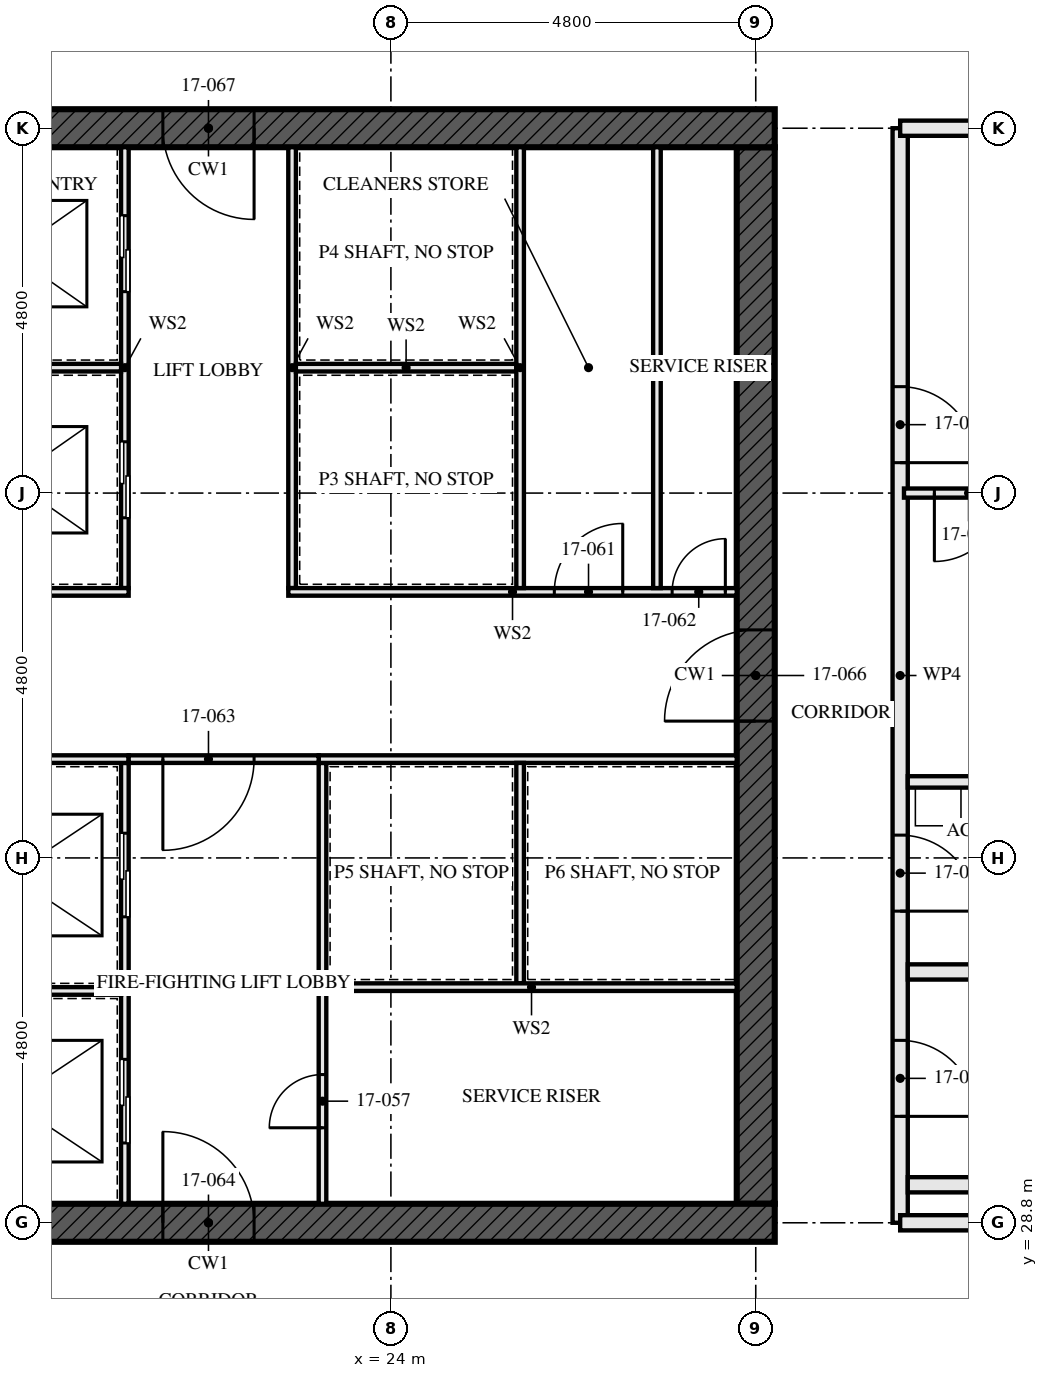
"""IFC4 building model, lengths in metres.
Left out: names, types, materials, properties, quantities, classifications, styles, units other than length and angle.
Written with IfcOpenShell. Run it as: python <this file> out.ifc"""

import sys

from ifc_helpers import new_model, si_unit, direction, frame, frame_2d, origin, place, context, subcontext, project, spatial, rectangle, extrude, element, fill, save


model = new_model("IFC4")
c1 = context("Model", 3, precision=1e-05, world=origin(), true_north=direction((0.0, 1.0)))
c2 = subcontext(c1, "Body", "Model", "MODEL_VIEW")
j1 = project(units=[si_unit("LENGTHUNIT", "METRE"), si_unit("PLANEANGLEUNIT", "RADIAN")], contexts=[c1])
p1 = place(None, origin())
s1 = spatial("IfcSite", under=j1, at=p1, CompositionType="ELEMENT")
p2 = place(p1, origin())
s2 = spatial("IfcBuilding", under=s1, at=p2, CompositionType="ELEMENT")
p3 = place(p2, frame((0.0, 0.0, 65.5)))
s3 = spatial("IfcBuildingStorey", under=s2, at=p3, CompositionType="ELEMENT", Elevation=65.5)
p4 = place(p3, frame((14.15, 28.8, -0.17), z_axis=(0.0, 0.0, 1.0), x_axis=(1.0, 0.0, 0.0)))
e1 = element("IfcWall", 1, at=p4, inside=s3, PredefinedType="SHEAR", context=c2, shape_type="SweptSolid", body=[
    extrude(rectangle(XDim=14.9, YDim=0.5, at=frame_2d((7.45, 0.0))), origin(), (0.0, 0.0, 1.0), 3.5),
])
p5 = place(p4, frame((6.85, 0.0, 0.17)))
e2 = element("IfcOpeningElement", 2, at=p5, cuts=e1, PredefinedType="OPENING", context=c2, shape_type="SweptSolid", body=[
    extrude(rectangle(XDim=1.2, YDim=2.1, at=frame_2d((0.6, 1.05))), frame((0.0, 0.26, 0.0), z_axis=(0.0, -1.0, 0.0), x_axis=(1.0, 0.0, 0.0)), (0.0, 0.0, 1.0), 0.521),
])
p6 = place(p3, frame((29.05, 43.2, -0.17), z_axis=(0.0, 0.0, 1.0), x_axis=(-1.0, 0.0, 0.0)))
e3 = element("IfcWall", 3, at=p6, inside=s3, PredefinedType="SHEAR", context=c2, shape_type="SweptSolid", body=[
    extrude(rectangle(XDim=14.9, YDim=0.5, at=frame_2d((7.45, 0.0))), origin(), (0.0, 0.0, 1.0), 3.5),
])
p7 = place(p6, frame((6.85, 0.0, 0.17)))
e4 = element("IfcOpeningElement", 4, at=p7, cuts=e3, PredefinedType="OPENING", context=c2, shape_type="SweptSolid", body=[
    extrude(rectangle(XDim=1.2, YDim=2.1, at=frame_2d((0.6, 1.05))), frame((0.0, 0.26, 0.0), z_axis=(0.0, -1.0, 0.0), x_axis=(1.0, 0.0, 0.0)), (0.0, 0.0, 1.0), 0.521),
])
p8 = place(p3, frame((28.8, 29.05, -0.17), z_axis=(0.0, 0.0, 1.0), x_axis=(0.0, 1.0, 0.0)))
e5 = element("IfcWall", 5, at=p8, inside=s3, PredefinedType="SHEAR", context=c2, shape_type="SweptSolid", body=[
    extrude(rectangle(XDim=13.9, YDim=0.5, at=frame_2d((6.95, 0.0))), origin(), (0.0, 0.0, 1.0), 3.5),
])
p9 = place(p8, frame((6.35, 0.0, 0.17)))
e6 = element("IfcOpeningElement", 6, at=p9, cuts=e5, PredefinedType="OPENING", context=c2, shape_type="SweptSolid", body=[
    extrude(rectangle(XDim=1.2, YDim=2.1, at=frame_2d((0.6, 1.05))), frame((0.0, 0.26, 0.0), z_axis=(0.0, -1.0, 0.0), x_axis=(1.0, 0.0, 0.0)), (0.0, 0.0, 1.0), 0.521),
])
for number, where, z_axis, x_axis in (
    (7, (35.5, 29.3, 0.0), (0.0, 0.0, 1.0), (-1.0, 0.0, 0.0)),
    (8, (35.5, 32.1, 0.0), (0.0, 0.0, 1.0), (-1.0, 0.0, 0.0)),
):
    element("IfcWall", number, at=place(p3, frame(where, z_axis=z_axis, x_axis=x_axis)), inside=s3, PredefinedType="SOLIDWALL", context=c2, shape_type="SweptSolid", body=[
        extrude(rectangle(XDim=4.7, YDim=0.2, at=frame_2d((2.35, 0.0))), origin(), (0.0, 0.0, 1.0), 2.99),
    ])
p10 = place(p3, frame((33.8, 34.6, 0.0), z_axis=(0.0, 0.0, 1.0), x_axis=(-1.0, 0.0, 0.0)))
e9 = element("IfcWall", 9, at=p10, inside=s3, PredefinedType="PARTITIONING", context=c2, shape_type="SweptSolid", body=[
    extrude(rectangle(XDim=3.0, YDim=0.15, at=frame_2d((1.5, 0.0))), origin(), (0.0, 0.0, 1.0), 3.33),
])
p11 = place(p3, frame((35.4, 38.4, 0.0), z_axis=(0.0, 0.0, 1.0), x_axis=(-1.0, 0.0, 0.0)))
e10 = element("IfcWall", 10, at=p11, inside=s3, PredefinedType="PARTITIONING", context=c2, shape_type="SweptSolid", body=[
    extrude(rectangle(XDim=4.65, YDim=0.12, at=frame_2d((2.325, 0.0))), origin(), (0.0, 0.0, 1.0), 2.55),
])
p12 = place(p11, frame((3.35, 0.0, 0.0)))
e11 = element("IfcOpeningElement", 11, at=p12, cuts=e10, PredefinedType="OPENING", context=c2, shape_type="SweptSolid", body=[
    extrude(rectangle(XDim=0.9, YDim=2.1, at=frame_2d((0.45, 1.05))), frame((0.0, 0.071, 0.0), z_axis=(0.0, -1.0, 0.0), x_axis=(1.0, 0.0, 0.0)), (0.0, 0.0, 1.0), 0.141),
])
p13 = place(p3, frame((30.7, 28.8, 0.0), z_axis=(0.0, 0.0, 1.0), x_axis=(0.0, 1.0, 0.0)))
e12 = element("IfcWall", 12, at=p13, inside=s3, PredefinedType="PARTITIONING", context=c2, shape_type="SweptSolid", body=[
    extrude(rectangle(XDim=14.4, YDim=0.2, at=frame_2d((7.2, 0.0))), origin(), (0.0, 0.0, 1.0), 2.55),
])
p14 = place(p13, frame((1.4, 0.0, 0.0)))
e13 = element("IfcOpeningElement", 13, at=p14, cuts=e12, PredefinedType="OPENING", context=c2, shape_type="SweptSolid", body=[
    extrude(rectangle(XDim=1.0, YDim=2.1, at=frame_2d((0.5, 1.05))), frame((0.0, 0.111, 0.0), z_axis=(0.0, -1.0, 0.0), x_axis=(1.0, 0.0, 0.0)), (0.0, 0.0, 1.0), 0.221),
])
p15 = place(p13, frame((4.1, 0.0, 0.0)))
e14 = element("IfcOpeningElement", 14, at=p15, cuts=e12, PredefinedType="OPENING", context=c2, shape_type="SweptSolid", body=[
    extrude(rectangle(XDim=1.0, YDim=2.1, at=frame_2d((0.5, 1.05))), frame((0.0, 0.111, 0.0), z_axis=(0.0, -1.0, 0.0), x_axis=(1.0, 0.0, 0.0)), (0.0, 0.0, 1.0), 0.221),
])
p16 = place(p13, frame((10.0, 0.0, 0.0)))
e15 = element("IfcOpeningElement", 15, at=p16, cuts=e12, PredefinedType="OPENING", context=c2, shape_type="SweptSolid", body=[
    extrude(rectangle(XDim=1.0, YDim=2.1, at=frame_2d((0.5, 1.05))), frame((0.0, 0.111, 0.0), z_axis=(0.0, -1.0, 0.0), x_axis=(1.0, 0.0, 0.0)), (0.0, 0.0, 1.0), 0.221),
])
p17 = place(p3, frame((27.5, 37.15, 0.0), z_axis=(0.0, 0.0, 1.0), x_axis=(0.0, 1.0, 0.0)))
e16 = element("IfcWall", 16, at=p17, inside=s3, PredefinedType="SOLIDWALL", context=c2, shape_type="SweptSolid", body=[
    extrude(rectangle(XDim=5.8, YDim=0.1, at=frame_2d((2.9, 0.0))), origin(), (0.0, 0.0, 1.0), 3.33),
])
p18 = place(p3, frame((20.5, 29.05, 0.0), z_axis=(0.0, 0.0, 1.0), x_axis=(0.0, 1.0, 0.0)))
e17 = element("IfcWall", 17, at=p18, inside=s3, PredefinedType="SOLIDWALL", context=c2, shape_type="SweptSolid", body=[
    extrude(rectangle(XDim=5.8, YDim=0.1, at=frame_2d((2.9, 0.0))), origin(), (0.0, 0.0, 1.0), 3.33),
])
p19 = place(p18, frame((0.8, 0.0, 0.0)))
e18 = element("IfcOpeningElement", 18, at=p19, cuts=e17, PredefinedType="OPENING", context=c2, shape_type="SweptSolid", body=[
    extrude(rectangle(XDim=1.1, YDim=2.3, at=frame_2d((0.55, 1.15))), frame((0.0, 0.061, 0.0), z_axis=(0.0, -1.0, 0.0), x_axis=(1.0, 0.0, 0.0)), (0.0, 0.0, 1.0), 0.121),
])
p20 = place(p18, frame((3.775, 0.0, 0.0)))
e19 = element("IfcOpeningElement", 19, at=p20, cuts=e17, PredefinedType="OPENING", context=c2, shape_type="SweptSolid", body=[
    extrude(rectangle(XDim=1.1, YDim=2.3, at=frame_2d((0.55, 1.15))), frame((0.0, 0.061, 0.0), z_axis=(0.0, -1.0, 0.0), x_axis=(1.0, 0.0, 0.0)), (0.0, 0.0, 1.0), 0.121),
])
p21 = place(p3, frame((20.5, 37.15, 0.0), z_axis=(0.0, 0.0, 1.0), x_axis=(0.0, 1.0, 0.0)))
e20 = element("IfcWall", 20, at=p21, inside=s3, PredefinedType="SOLIDWALL", context=c2, shape_type="SweptSolid", body=[
    extrude(rectangle(XDim=5.8, YDim=0.1, at=frame_2d((2.9, 0.0))), origin(), (0.0, 0.0, 1.0), 3.33),
])
p22 = place(p21, frame((0.925, 0.0, 0.0)))
e21 = element("IfcOpeningElement", 21, at=p22, cuts=e20, PredefinedType="OPENING", context=c2, shape_type="SweptSolid", body=[
    extrude(rectangle(XDim=1.0, YDim=2.1, at=frame_2d((0.5, 1.05))), frame((0.0, 0.061, 0.0), z_axis=(0.0, -1.0, 0.0), x_axis=(1.0, 0.0, 0.0)), (0.0, 0.0, 1.0), 0.121),
])
p23 = place(p21, frame((3.9, 0.0, 0.0)))
e22 = element("IfcOpeningElement", 22, at=p23, cuts=e20, PredefinedType="OPENING", context=c2, shape_type="SweptSolid", body=[
    extrude(rectangle(XDim=1.0, YDim=2.1, at=frame_2d((0.5, 1.05))), frame((0.0, 0.061, 0.0), z_axis=(0.0, -1.0, 0.0), x_axis=(1.0, 0.0, 0.0)), (0.0, 0.0, 1.0), 0.121),
])
p24 = place(p3, frame((22.7, 37.15, 0.0), z_axis=(0.0, 0.0, 1.0), x_axis=(0.0, 1.0, 0.0)))
e23 = element("IfcWall", 23, at=p24, inside=s3, PredefinedType="SOLIDWALL", context=c2, shape_type="SweptSolid", body=[
    extrude(rectangle(XDim=5.8, YDim=0.1, at=frame_2d((2.9, 0.0))), origin(), (0.0, 0.0, 1.0), 3.33),
])
p25 = place(p3, frame((23.1, 29.05, 0.0), z_axis=(0.0, 0.0, 1.0), x_axis=(0.0, 1.0, 0.0)))
e24 = element("IfcWall", 24, at=p25, inside=s3, PredefinedType="SOLIDWALL", context=c2, shape_type="SweptSolid", body=[
    extrude(rectangle(XDim=5.8, YDim=0.1, at=frame_2d((2.9, 0.0))), origin(), (0.0, 0.0, 1.0), 3.33),
])
p26 = place(p25, frame((1.0, 0.0, 0.0)))
e25 = element("IfcOpeningElement", 25, at=p26, cuts=e24, PredefinedType="OPENING", context=c2, shape_type="SweptSolid", body=[
    extrude(rectangle(XDim=0.7, YDim=2.1, at=frame_2d((0.35, 1.05))), frame((0.0, 0.061, 0.0), z_axis=(0.0, -1.0, 0.0), x_axis=(1.0, 0.0, 0.0)), (0.0, 0.0, 1.0), 0.121),
])
p27 = place(p3, frame((14.65, 34.9, 0.0), z_axis=(0.0, 0.0, 1.0), x_axis=(1.0, 0.0, 0.0)))
e26 = element("IfcWall", 26, at=p27, inside=s3, PredefinedType="SOLIDWALL", context=c2, shape_type="SweptSolid", body=[
    extrude(rectangle(XDim=5.9, YDim=0.1, at=frame_2d((2.95, 0.0))), origin(), (0.0, 0.0, 1.0), 3.33),
])
p28 = place(p27, frame((1.6, 0.0, 0.0)))
e27 = element("IfcOpeningElement", 27, at=p28, cuts=e26, PredefinedType="OPENING", context=c2, shape_type="SweptSolid", body=[
    extrude(rectangle(XDim=0.7, YDim=2.1, at=frame_2d((0.35, 1.05))), frame((0.0, 0.061, 0.0), z_axis=(0.0, -1.0, 0.0), x_axis=(1.0, 0.0, 0.0)), (0.0, 0.0, 1.0), 0.121),
])
p29 = place(p3, frame((23.05, 34.9, 0.0), z_axis=(0.0, 0.0, 1.0), x_axis=(1.0, 0.0, 0.0)))
e28 = element("IfcWall", 28, at=p29, inside=s3, PredefinedType="SOLIDWALL", context=c2, shape_type="SweptSolid", body=[
    extrude(rectangle(XDim=5.5, YDim=0.1, at=frame_2d((2.75, 0.0))), origin(), (0.0, 0.0, 1.0), 3.33),
])
p30 = place(p3, frame((14.65, 37.1, 0.0), z_axis=(0.0, 0.0, 1.0), x_axis=(1.0, 0.0, 0.0)))
e29 = element("IfcWall", 29, at=p30, inside=s3, PredefinedType="SOLIDWALL", context=c2, shape_type="SweptSolid", body=[
    extrude(rectangle(XDim=5.9, YDim=0.1, at=frame_2d((2.95, 0.0))), origin(), (0.0, 0.0, 1.0), 3.33),
])
p31 = place(p30, frame((0.15, 0.0, 0.0)))
e30 = element("IfcOpeningElement", 30, at=p31, cuts=e29, PredefinedType="OPENING", context=c2, shape_type="SweptSolid", body=[
    extrude(rectangle(XDim=0.7, YDim=2.1, at=frame_2d((0.35, 1.05))), frame((0.0, 0.061, 0.0), z_axis=(0.0, -1.0, 0.0), x_axis=(1.0, 0.0, 0.0)), (0.0, 0.0, 1.0), 0.121),
])
p32 = place(p30, frame((1.5, 0.0, 0.0)))
e31 = element("IfcOpeningElement", 31, at=p32, cuts=e29, PredefinedType="OPENING", context=c2, shape_type="SweptSolid", body=[
    extrude(rectangle(XDim=0.9, YDim=2.1, at=frame_2d((0.45, 1.05))), frame((0.0, 0.061, 0.0), z_axis=(0.0, -1.0, 0.0), x_axis=(1.0, 0.0, 0.0)), (0.0, 0.0, 1.0), 0.121),
])
p33 = place(p3, frame((22.65, 37.1, 0.0), z_axis=(0.0, 0.0, 1.0), x_axis=(1.0, 0.0, 0.0)))
e32 = element("IfcWall", 32, at=p33, inside=s3, PredefinedType="SOLIDWALL", context=c2, shape_type="SweptSolid", body=[
    extrude(rectangle(XDim=5.9, YDim=0.1, at=frame_2d((2.95, 0.0))), origin(), (0.0, 0.0, 1.0), 3.33),
])
p34 = place(p33, frame((3.5, 0.0, 0.0)))
e33 = element("IfcOpeningElement", 33, at=p34, cuts=e32, PredefinedType="OPENING", context=c2, shape_type="SweptSolid", body=[
    extrude(rectangle(XDim=0.9, YDim=2.1, at=frame_2d((0.45, 1.05))), frame((0.0, 0.061, 0.0), z_axis=(0.0, -1.0, 0.0), x_axis=(1.0, 0.0, 0.0)), (0.0, 0.0, 1.0), 0.121),
])
p35 = place(p33, frame((5.05, 0.0, 0.0)))
e34 = element("IfcOpeningElement", 34, at=p35, cuts=e32, PredefinedType="OPENING", context=c2, shape_type="SweptSolid", body=[
    extrude(rectangle(XDim=0.7, YDim=2.1, at=frame_2d((0.35, 1.05))), frame((0.0, 0.061, 0.0), z_axis=(0.0, -1.0, 0.0), x_axis=(1.0, 0.0, 0.0)), (0.0, 0.0, 1.0), 0.121),
])
p36 = place(p3, frame((20.55, 34.9, 0.0), z_axis=(0.0, 0.0, 1.0), x_axis=(1.0, 0.0, 0.0)))
e35 = element("IfcWall", 35, at=p36, inside=s3, PredefinedType="SOLIDWALL", context=c2, shape_type="SweptSolid", body=[
    extrude(rectangle(XDim=2.5, YDim=0.1, at=frame_2d((1.25, 0.0))), origin(), (0.0, 0.0, 1.0), 3.33),
])
p37 = place(p36, frame((0.45, 0.0, 0.0)))
e36 = element("IfcOpeningElement", 36, at=p37, cuts=e35, PredefinedType="OPENING", context=c2, shape_type="SweptSolid", body=[
    extrude(rectangle(XDim=1.2, YDim=2.1, at=frame_2d((0.6, 1.05))), frame((0.0, 0.061, 0.0), z_axis=(0.0, -1.0, 0.0), x_axis=(1.0, 0.0, 0.0)), (0.0, 0.0, 1.0), 0.121),
])
for number, where, z_axis, x_axis in (
    (37, (17.55, 31.85, 0.0), (0.0, 0.0, 1.0), (1.0, 0.0, 0.0)),
    (38, (17.55, 40.05, 0.0), (0.0, 0.0, 1.0), (1.0, 0.0, 0.0)),
    (39, (22.75, 40.05, 0.0), (0.0, 0.0, 1.0), (1.0, 0.0, 0.0)),
):
    element("IfcWall", number, at=place(p3, frame(where, z_axis=z_axis, x_axis=x_axis)), inside=s3, PredefinedType="SOLIDWALL", context=c2, shape_type="SweptSolid", body=[
        extrude(rectangle(XDim=2.9, YDim=0.1, at=frame_2d((1.45, 0.0))), origin(), (0.0, 0.0, 1.0), 3.33),
    ])
p38 = place(p3, frame((25.7, 37.15, 0.0), z_axis=(0.0, 0.0, 1.0), x_axis=(0.0, 1.0, 0.0)))
e40 = element("IfcWall", 40, at=p38, inside=s3, PredefinedType="SOLIDWALL", context=c2, shape_type="SweptSolid", body=[
    extrude(rectangle(XDim=5.8, YDim=0.1, at=frame_2d((2.9, 0.0))), origin(), (0.0, 0.0, 1.0), 3.33),
])
p39 = place(p3, frame((25.7, 31.95, 0.0), z_axis=(0.0, 0.0, 1.0), x_axis=(0.0, 1.0, 0.0)))
e41 = element("IfcWall", 41, at=p39, inside=s3, PredefinedType="SOLIDWALL", context=c2, shape_type="SweptSolid", body=[
    extrude(rectangle(XDim=2.9, YDim=0.1, at=frame_2d((1.45, 0.0))), origin(), (0.0, 0.0, 1.0), 3.33),
])
p40 = place(p3, frame((23.15, 31.9, 0.0), z_axis=(0.0, 0.0, 1.0), x_axis=(1.0, 0.0, 0.0)))
e42 = element("IfcWall", 42, at=p40, inside=s3, PredefinedType="SOLIDWALL", context=c2, shape_type="SweptSolid", body=[
    extrude(rectangle(XDim=5.4, YDim=0.1, at=frame_2d((2.7, 0.0))), origin(), (0.0, 0.0, 1.0), 3.33),
])
for number, where, z_axis, x_axis in (
    (43, (33.205, 28.8, 0.0), (0.0, 0.0, 1.0), (-1.0, 0.0, 0.0)),
    (44, (33.205, 43.2, 0.0), (0.0, 0.0, 1.0), (-1.0, 0.0, 0.0)),
):
    element("IfcWall", number, at=place(p3, frame(where, z_axis=z_axis, x_axis=x_axis)), inside=s3, PredefinedType="PARTITIONING", context=c2, shape_type="SweptSolid", body=[
        extrude(rectangle(XDim=2.505, YDim=0.2, at=frame_2d((1.252, 0.0))), origin(), (0.0, 0.0, 1.0), 2.32),
    ])
p41 = place(p12, origin())
e45 = element("IfcDoor", 45, at=p41, inside=s3, OperationType="SINGLE_SWING_LEFT", PredefinedType="DOOR", context=c2, shape_type="SweptSolid", body=[
    extrude(rectangle(XDim=0.9, YDim=2.1, at=frame_2d((0.45, 1.05))), frame((0.0, 0.022, 0.0), z_axis=(0.0, -1.0, 0.0), x_axis=(1.0, 0.0, 0.0)), (0.0, 0.0, 1.0), 0.044),
])
fill(e11, e45)
p42 = place(p14, frame((1.0, 0.0, 0.0), z_axis=(0.0, 0.0, 1.0), x_axis=(-1.0, 0.0, 0.0)))
e46 = element("IfcDoor", 46, at=p42, inside=s3, OperationType="SINGLE_SWING_LEFT", PredefinedType="DOOR", context=c2, shape_type="SweptSolid", body=[
    extrude(rectangle(XDim=1.0, YDim=2.1, at=frame_2d((0.5, 1.05))), frame((0.0, 0.032, 0.0), z_axis=(0.0, -1.0, 0.0), x_axis=(1.0, 0.0, 0.0)), (0.0, 0.0, 1.0), 0.064),
])
fill(e13, e46)
p43 = place(p15, frame((1.0, 0.0, 0.0), z_axis=(0.0, 0.0, 1.0), x_axis=(-1.0, 0.0, 0.0)))
e47 = element("IfcDoor", 47, at=p43, inside=s3, OperationType="SINGLE_SWING_LEFT", PredefinedType="DOOR", context=c2, shape_type="SweptSolid", body=[
    extrude(rectangle(XDim=1.0, YDim=2.1, at=frame_2d((0.5, 1.05))), frame((0.0, 0.027, 0.0), z_axis=(0.0, -1.0, 0.0), x_axis=(1.0, 0.0, 0.0)), (0.0, 0.0, 1.0), 0.054),
])
fill(e14, e47)
p44 = place(p16, frame((1.0, 0.0, 0.0), z_axis=(0.0, 0.0, 1.0), x_axis=(-1.0, 0.0, 0.0)))
e48 = element("IfcDoor", 48, at=p44, inside=s3, OperationType="SINGLE_SWING_LEFT", PredefinedType="DOOR", context=c2, shape_type="SweptSolid", body=[
    extrude(rectangle(XDim=1.0, YDim=2.1, at=frame_2d((0.5, 1.05))), frame((0.0, 0.027, 0.0), z_axis=(0.0, -1.0, 0.0), x_axis=(1.0, 0.0, 0.0)), (0.0, 0.0, 1.0), 0.054),
])
fill(e15, e48)
p45 = place(p19, origin())
e49 = element("IfcDoor", 49, at=p45, inside=s3, OperationType="SLIDING_TO_LEFT", PredefinedType="DOOR", context=c2, shape_type="SweptSolid", body=[
    extrude(rectangle(XDim=1.1, YDim=2.3, at=frame_2d((0.55, 1.15))), frame((0.0, 0.05, 0.0), z_axis=(0.0, -1.0, 0.0), x_axis=(1.0, 0.0, 0.0)), (0.0, 0.0, 1.0), 0.1),
])
fill(e18, e49)
p46 = place(p20, origin())
e50 = element("IfcDoor", 50, at=p46, inside=s3, OperationType="SLIDING_TO_LEFT", PredefinedType="DOOR", context=c2, shape_type="SweptSolid", body=[
    extrude(rectangle(XDim=1.1, YDim=2.3, at=frame_2d((0.55, 1.15))), frame((0.0, 0.05, 0.0), z_axis=(0.0, -1.0, 0.0), x_axis=(1.0, 0.0, 0.0)), (0.0, 0.0, 1.0), 0.1),
])
fill(e19, e50)
p47 = place(p22, origin())
e51 = element("IfcDoor", 51, at=p47, inside=s3, OperationType="SLIDING_TO_LEFT", PredefinedType="DOOR", context=c2, shape_type="SweptSolid", body=[
    extrude(rectangle(XDim=1.0, YDim=2.1, at=frame_2d((0.5, 1.05))), frame((0.0, 0.05, 0.0), z_axis=(0.0, -1.0, 0.0), x_axis=(1.0, 0.0, 0.0)), (0.0, 0.0, 1.0), 0.1),
])
fill(e21, e51)
p48 = place(p23, origin())
e52 = element("IfcDoor", 52, at=p48, inside=s3, OperationType="SLIDING_TO_LEFT", PredefinedType="DOOR", context=c2, shape_type="SweptSolid", body=[
    extrude(rectangle(XDim=1.0, YDim=2.1, at=frame_2d((0.5, 1.05))), frame((0.0, 0.05, 0.0), z_axis=(0.0, -1.0, 0.0), x_axis=(1.0, 0.0, 0.0)), (0.0, 0.0, 1.0), 0.1),
])
fill(e22, e52)
p49 = place(p26, origin())
e53 = element("IfcDoor", 53, at=p49, inside=s3, OperationType="SINGLE_SWING_RIGHT", PredefinedType="DOOR", context=c2, shape_type="SweptSolid", body=[
    extrude(rectangle(XDim=0.7, YDim=2.1, at=frame_2d((0.35, 1.05))), frame((0.0, 0.027, 0.0), z_axis=(0.0, -1.0, 0.0), x_axis=(1.0, 0.0, 0.0)), (0.0, 0.0, 1.0), 0.054),
])
fill(e25, e53)
p50 = place(p34, origin())
e54 = element("IfcDoor", 54, at=p50, inside=s3, OperationType="SINGLE_SWING_LEFT", PredefinedType="DOOR", context=c2, shape_type="SweptSolid", body=[
    extrude(rectangle(XDim=0.9, YDim=2.1, at=frame_2d((0.45, 1.05))), frame((0.0, 0.027, 0.0), z_axis=(0.0, -1.0, 0.0), x_axis=(1.0, 0.0, 0.0)), (0.0, 0.0, 1.0), 0.054),
])
fill(e33, e54)
p51 = place(p35, origin())
e55 = element("IfcDoor", 55, at=p51, inside=s3, OperationType="SINGLE_SWING_LEFT", PredefinedType="DOOR", context=c2, shape_type="SweptSolid", body=[
    extrude(rectangle(XDim=0.7, YDim=2.1, at=frame_2d((0.35, 1.05))), frame((0.0, 0.027, 0.0), z_axis=(0.0, -1.0, 0.0), x_axis=(1.0, 0.0, 0.0)), (0.0, 0.0, 1.0), 0.054),
])
fill(e34, e55)
p52 = place(p37, frame((1.2, 0.0, 0.0), z_axis=(0.0, 0.0, 1.0), x_axis=(-1.0, 0.0, 0.0)))
e56 = element("IfcDoor", 56, at=p52, inside=s3, OperationType="SINGLE_SWING_LEFT", PredefinedType="DOOR", context=c2, shape_type="SweptSolid", body=[
    extrude(rectangle(XDim=1.2, YDim=2.1, at=frame_2d((0.6, 1.05))), frame((0.0, 0.027, 0.0), z_axis=(0.0, -1.0, 0.0), x_axis=(1.0, 0.0, 0.0)), (0.0, 0.0, 1.0), 0.054),
])
fill(e36, e56)
p53 = place(p5, origin())
e57 = element("IfcDoor", 57, at=p53, inside=s3, OperationType="SINGLE_SWING_LEFT", PredefinedType="DOOR", context=c2, shape_type="SweptSolid", body=[
    extrude(rectangle(XDim=1.2, YDim=2.1, at=frame_2d((0.6, 1.05))), frame((0.0, 0.027, 0.0), z_axis=(0.0, -1.0, 0.0), x_axis=(1.0, 0.0, 0.0)), (0.0, 0.0, 1.0), 0.054),
])
fill(e2, e57)
p54 = place(p9, origin())
e58 = element("IfcDoor", 58, at=p54, inside=s3, OperationType="SINGLE_SWING_LEFT", PredefinedType="DOOR", context=c2, shape_type="SweptSolid", body=[
    extrude(rectangle(XDim=1.2, YDim=2.1, at=frame_2d((0.6, 1.05))), frame((0.0, 0.027, 0.0), z_axis=(0.0, -1.0, 0.0), x_axis=(1.0, 0.0, 0.0)), (0.0, 0.0, 1.0), 0.054),
])
fill(e6, e58)
p55 = place(p7, origin())
e59 = element("IfcDoor", 59, at=p55, inside=s3, OperationType="SINGLE_SWING_LEFT", PredefinedType="DOOR", context=c2, shape_type="SweptSolid", body=[
    extrude(rectangle(XDim=1.2, YDim=2.1, at=frame_2d((0.6, 1.05))), frame((0.0, 0.027, 0.0), z_axis=(0.0, -1.0, 0.0), x_axis=(1.0, 0.0, 0.0)), (0.0, 0.0, 1.0), 0.054),
])
fill(e4, e59)
save(model, sys.argv[1])
